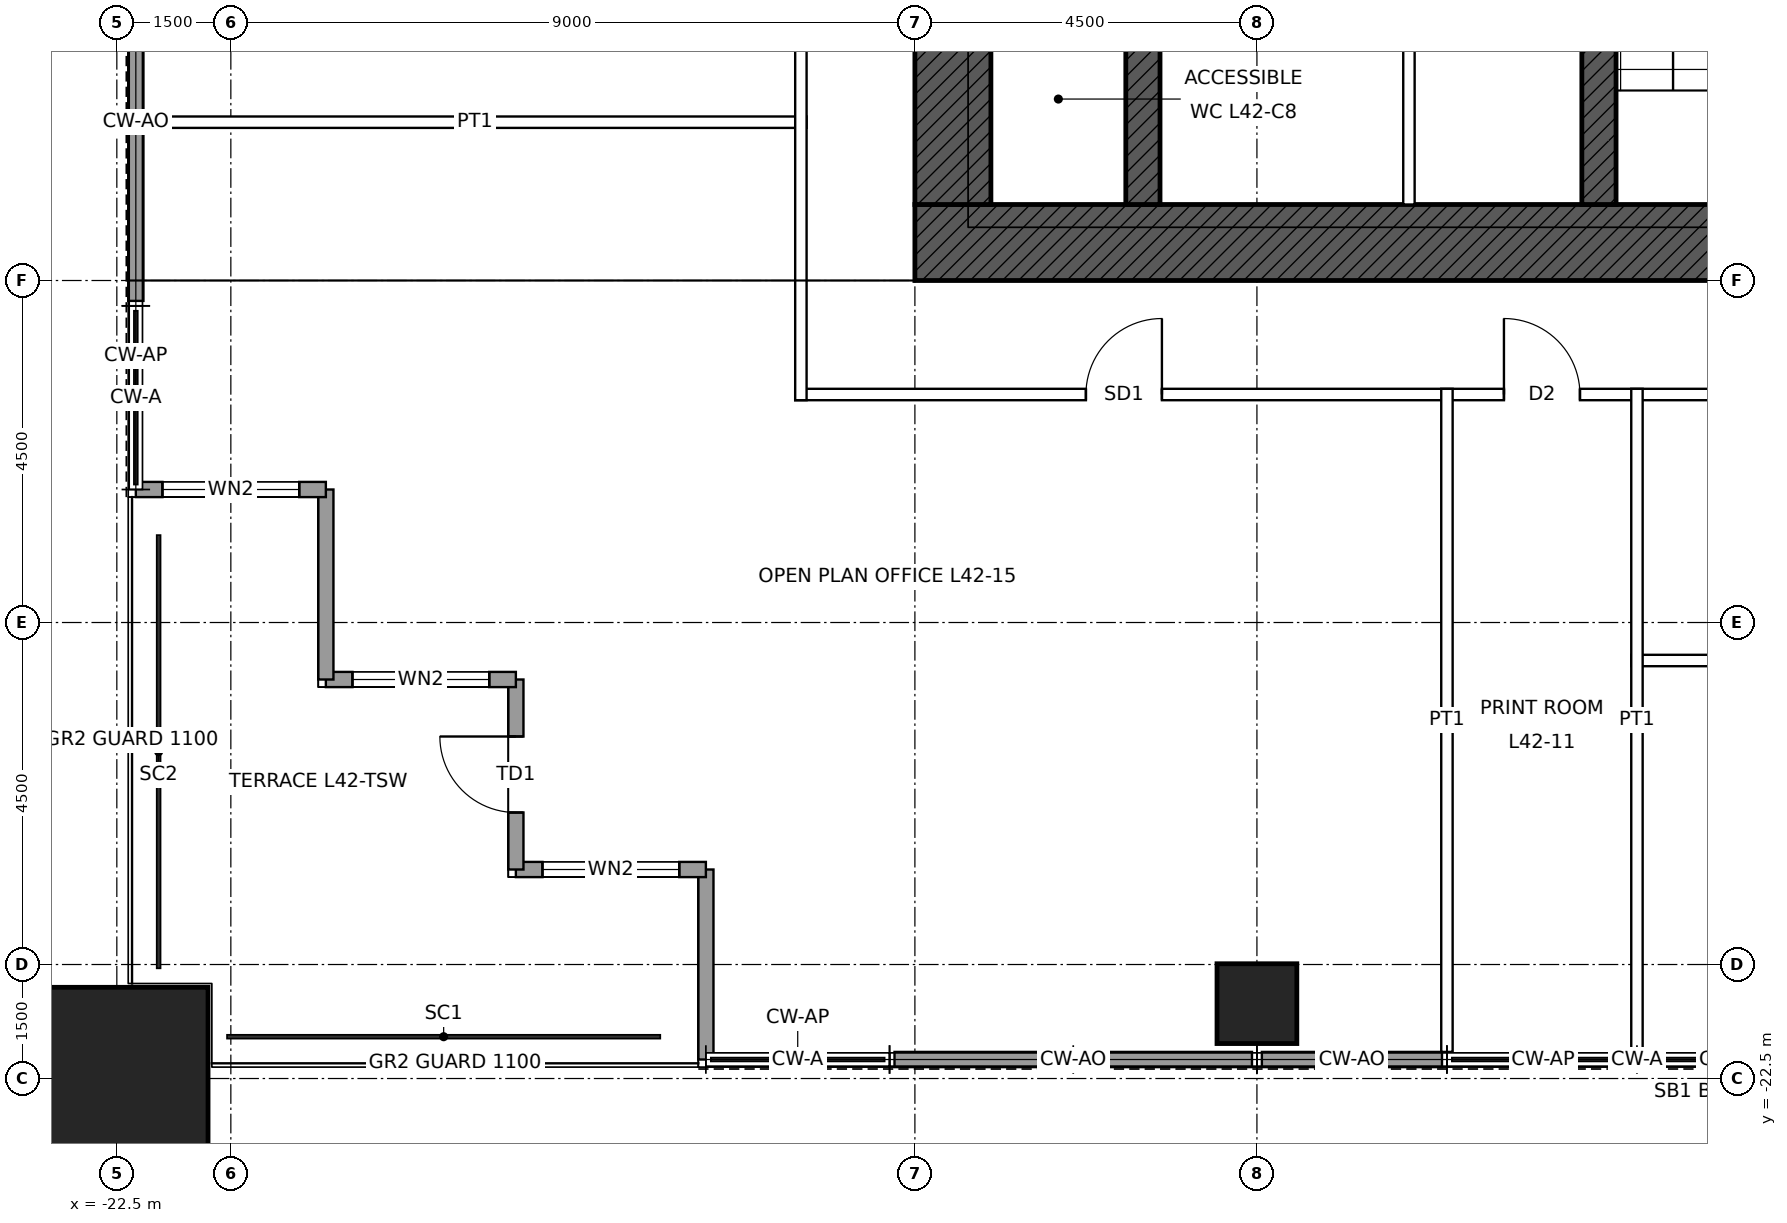
"""IFC4 building model, lengths in metres.
Left out: names, types, materials, properties, quantities, classifications, styles, units other than length and angle.
Written with IfcOpenShell. Run it as: python <this file> out.ifc"""

import sys

from ifc_helpers import new_model, si_unit, direction, frame, frame_2d, origin, origin_2d, place, context, subcontext, project, spatial, rectangle, hollow_rectangle, extrude, element, fill, save


model = new_model("IFC4")
c1 = context("Model", 3, precision=1e-05, world=origin(), true_north=direction((0.0, 1.0)))
c2 = subcontext(c1, "Body", "Model", "MODEL_VIEW")
j1 = project(units=[si_unit("LENGTHUNIT", "METRE"), si_unit("PLANEANGLEUNIT", "RADIAN")], contexts=[c1])
p1 = place(None, origin())
s1 = spatial("IfcSite", under=j1, at=p1, CompositionType="ELEMENT")
p2 = place(p1, origin())
s2 = spatial("IfcBuilding", under=s1, at=p2, CompositionType="ELEMENT")
p3 = place(p2, frame((0.0, 0.0, 201.9)))
s3 = spatial("IfcBuildingStorey", under=s2, at=p3, CompositionType="ELEMENT", Elevation=201.9)
p4 = place(p3, frame((-22.5, -22.5, 0.0), z_axis=(0.0, 0.0, 1.0), x_axis=(1.0, 0.0, 0.0)))
e1 = element("IfcColumn", 1, at=p4, inside=s3, PredefinedType="COLUMN", context=c2, shape_type="SweptSolid", body=[
    extrude(hollow_rectangle(XDim=2.4, YDim=2.4, WallThickness=0.12, at=origin_2d()), origin(), (0.0, 0.0, 1.0), 4.0),
])
p5 = place(p3, frame((-7.5, -21.515, 0.0), z_axis=(0.0, 0.0, 1.0), x_axis=(1.0, 0.0, 0.0)))
e2 = element("IfcColumn", 2, at=p5, inside=s3, PredefinedType="COLUMN", context=c2, shape_type="SweptSolid", body=[
    extrude(hollow_rectangle(XDim=1.05, YDim=1.05, WallThickness=0.07, at=origin_2d()), origin(), (0.0, 0.0, 1.0), 4.0),
])
p6 = place(p3, frame((12.0, -11.5, 0.0), z_axis=(0.0, 0.0, 1.0), x_axis=(-1.0, 0.0, 0.0)))
e3 = element("IfcWall", 3, at=p6, inside=s3, PredefinedType="SHEAR", context=c2, shape_type="SweptSolid", body=[
    extrude(rectangle(XDim=24.0, YDim=1.0, at=frame_2d((12.0, 0.0))), origin(), (0.0, 0.0, 1.0), 4.0),
])
p7 = place(p6, frame((11.5, 0.0, 0.0)))
e4 = element("IfcOpeningElement", 4, at=p7, cuts=e3, PredefinedType="OPENING", context=c2, shape_type="SweptSolid", body=[
    extrude(rectangle(XDim=1.0, YDim=2.1, at=frame_2d((0.5, 1.05))), frame((0.0, 0.51, 0.0), z_axis=(0.0, -1.0, 0.0), x_axis=(1.0, 0.0, 0.0)), (0.0, 0.0, 1.0), 1.02),
])
p8 = place(p6, frame((1.0, 0.0, 0.0)))
e5 = element("IfcOpeningElement", 5, at=p8, cuts=e3, PredefinedType="OPENING", context=c2, shape_type="SweptSolid", body=[
    extrude(rectangle(XDim=1.0, YDim=2.4, at=frame_2d((0.5, 1.2))), frame((0.0, 0.51, 0.0), z_axis=(0.0, -1.0, 0.0), x_axis=(1.0, 0.0, 0.0)), (0.0, 0.0, 1.0), 1.02),
])
p9 = place(p3, frame((-11.5, -11.0, 0.0), z_axis=(0.0, 0.0, 1.0), x_axis=(0.0, 1.0, 0.0)))
e6 = element("IfcWall", 6, at=p9, inside=s3, PredefinedType="SHEAR", context=c2, shape_type="SweptSolid", body=[
    extrude(rectangle(XDim=22.0, YDim=1.0, at=frame_2d((11.0, 0.0))), origin(), (0.0, 0.0, 1.0), 4.0),
])
p10 = place(p9, frame((10.5, 0.0, 0.0)))
e7 = element("IfcOpeningElement", 7, at=p10, cuts=e6, PredefinedType="OPENING", context=c2, shape_type="SweptSolid", body=[
    extrude(rectangle(XDim=1.0, YDim=2.4, at=frame_2d((0.5, 1.2))), frame((0.0, 0.51, 0.0), z_axis=(0.0, -1.0, 0.0), x_axis=(1.0, 0.0, 0.0)), (0.0, 0.0, 1.0), 1.02),
])
p11 = place(p3, frame((-9.0, -11.0, 0.0), z_axis=(0.0, 0.0, 1.0), x_axis=(0.0, 1.0, 0.0)))
e8 = element("IfcWall", 8, at=p11, inside=s3, PredefinedType="SHEAR", context=c2, shape_type="SweptSolid", body=[
    extrude(rectangle(XDim=6.5, YDim=0.45, at=frame_2d((3.25, 0.0))), origin(), (0.0, 0.0, 1.0), 4.0),
])
p12 = place(p11, frame((4.25, 0.0, 0.0)))
e9 = element("IfcOpeningElement", 9, at=p12, cuts=e8, PredefinedType="OPENING", context=c2, shape_type="SweptSolid", body=[
    extrude(rectangle(XDim=1.0, YDim=2.1, at=frame_2d((0.5, 1.05))), frame((0.0, 0.235, 0.0), z_axis=(0.0, -1.0, 0.0), x_axis=(1.0, 0.0, 0.0)), (0.0, 0.0, 1.0), 0.47),
])
p13 = place(p3, frame((-3.0, -11.0, 0.0), z_axis=(0.0, 0.0, 1.0), x_axis=(0.0, 1.0, 0.0)))
e10 = element("IfcWall", 10, at=p13, inside=s3, PredefinedType="SHEAR", context=c2, shape_type="SweptSolid", body=[
    extrude(rectangle(XDim=6.5, YDim=0.45, at=frame_2d((3.25, 0.0))), origin(), (0.0, 0.0, 1.0), 4.0),
])
p14 = place(p3, frame((-14.75, -22.25, 0.0), z_axis=(0.0, 0.0, 1.0), x_axis=(0.0, 1.0, 0.0)))
e11 = element("IfcWall", 11, at=p14, inside=s3, PredefinedType="SOLIDWALL", context=c2, shape_type="SweptSolid", body=[
    extrude(rectangle(XDim=2.5, YDim=0.2, at=frame_2d((1.25, 0.0))), origin(), (0.0, 0.0, 1.0), 3.85),
])
p15 = place(p3, frame((-14.75, -19.75, 0.0), z_axis=(0.0, 0.0, 1.0), x_axis=(-1.0, 0.0, 0.0)))
e12 = element("IfcWall", 12, at=p15, inside=s3, PredefinedType="SOLIDWALL", context=c2, shape_type="SweptSolid", body=[
    extrude(rectangle(XDim=2.5, YDim=0.2, at=frame_2d((1.25, 0.0))), origin(), (0.0, 0.0, 1.0), 3.85),
])
p16 = place(p15, frame((0.35, 0.0, 0.3)))
e13 = element("IfcOpeningElement", 13, at=p16, cuts=e12, PredefinedType="OPENING", context=c2, shape_type="SweptSolid", body=[
    extrude(rectangle(XDim=1.8, YDim=2.4, at=frame_2d((0.9, 1.2))), frame((0.0, 0.11, 0.0), z_axis=(0.0, -1.0, 0.0), x_axis=(1.0, 0.0, 0.0)), (0.0, 0.0, 1.0), 0.22),
])
p17 = place(p3, frame((-17.25, -19.75, 0.0), z_axis=(0.0, 0.0, 1.0), x_axis=(0.0, 1.0, 0.0)))
e14 = element("IfcWall", 14, at=p17, inside=s3, PredefinedType="SOLIDWALL", context=c2, shape_type="SweptSolid", body=[
    extrude(rectangle(XDim=2.5, YDim=0.2, at=frame_2d((1.25, 0.0))), origin(), (0.0, 0.0, 1.0), 3.85),
])
p18 = place(p17, frame((0.75, 0.0, 0.0)))
e15 = element("IfcOpeningElement", 15, at=p18, cuts=e14, PredefinedType="OPENING", context=c2, shape_type="SweptSolid", body=[
    extrude(rectangle(XDim=1.0, YDim=2.4, at=frame_2d((0.5, 1.2))), frame((0.0, 0.11, 0.0), z_axis=(0.0, -1.0, 0.0), x_axis=(1.0, 0.0, 0.0)), (0.0, 0.0, 1.0), 0.22),
])
p19 = place(p3, frame((-17.25, -17.25, 0.0), z_axis=(0.0, 0.0, 1.0), x_axis=(-1.0, 0.0, 0.0)))
e16 = element("IfcWall", 16, at=p19, inside=s3, PredefinedType="SOLIDWALL", context=c2, shape_type="SweptSolid", body=[
    extrude(rectangle(XDim=2.5, YDim=0.2, at=frame_2d((1.25, 0.0))), origin(), (0.0, 0.0, 1.0), 3.85),
])
p20 = place(p19, frame((0.35, 0.0, 0.3)))
e17 = element("IfcOpeningElement", 17, at=p20, cuts=e16, PredefinedType="OPENING", context=c2, shape_type="SweptSolid", body=[
    extrude(rectangle(XDim=1.8, YDim=2.4, at=frame_2d((0.9, 1.2))), frame((0.0, 0.11, 0.0), z_axis=(0.0, -1.0, 0.0), x_axis=(1.0, 0.0, 0.0)), (0.0, 0.0, 1.0), 0.22),
])
p21 = place(p3, frame((-19.75, -17.25, 0.0), z_axis=(0.0, 0.0, 1.0), x_axis=(0.0, 1.0, 0.0)))
e18 = element("IfcWall", 18, at=p21, inside=s3, PredefinedType="SOLIDWALL", context=c2, shape_type="SweptSolid", body=[
    extrude(rectangle(XDim=2.5, YDim=0.2, at=frame_2d((1.25, 0.0))), origin(), (0.0, 0.0, 1.0), 3.85),
])
p22 = place(p3, frame((-19.75, -14.75, 0.0), z_axis=(0.0, 0.0, 1.0), x_axis=(-1.0, 0.0, 0.0)))
e19 = element("IfcWall", 19, at=p22, inside=s3, PredefinedType="SOLIDWALL", context=c2, shape_type="SweptSolid", body=[
    extrude(rectangle(XDim=2.5, YDim=0.2, at=frame_2d((1.25, 0.0))), origin(), (0.0, 0.0, 1.0), 3.85),
])
p23 = place(p22, frame((0.35, 0.0, 0.3)))
e20 = element("IfcOpeningElement", 20, at=p23, cuts=e19, PredefinedType="OPENING", context=c2, shape_type="SweptSolid", body=[
    extrude(rectangle(XDim=1.8, YDim=2.4, at=frame_2d((0.9, 1.2))), frame((0.0, 0.11, 0.0), z_axis=(0.0, -1.0, 0.0), x_axis=(1.0, 0.0, 0.0)), (0.0, 0.0, 1.0), 0.22),
])
p24 = place(p3, frame((-5.065, -22.25, 0.0), z_axis=(0.0, 0.0, 1.0), x_axis=(-1.0, 0.0, 0.0)))
e21 = element("IfcWall", 21, at=p24, inside=s3, PredefinedType="SOLIDWALL", context=c2, shape_type="SweptSolid", body=[
    extrude(rectangle(XDim=2.37, YDim=0.2, at=frame_2d((1.185, 0.0))), origin(), (0.0, 0.0, 1.0), 3.85),
])
for number, where, z_axis, x_axis in (
    (22, (-7.565, -22.25, 0.0), (0.0, 0.0, 1.0), (-1.0, 0.0, 0.0)),
    (23, (-9.949, -22.25, 0.0), (0.0, 0.0, 1.0), (-1.0, 0.0, 0.0)),
    (24, (-22.25, -12.268, 0.0), (0.0, 0.0, 1.0), (0.0, 1.0, 0.0)),
    (25, (-22.25, -9.884, 0.0), (0.0, 0.0, 1.0), (0.0, 1.0, 0.0)),
):
    element("IfcWall", number, at=place(p3, frame(where, z_axis=z_axis, x_axis=x_axis)), inside=s3, PredefinedType="SOLIDWALL", context=c2, shape_type="SweptSolid", body=[
        extrude(rectangle(XDim=2.319, YDim=0.2, at=frame_2d((1.16, 0.0))), origin(), (0.0, 0.0, 1.0), 3.85),
    ])
p25 = place(p3, frame((-2.575, -17.0, 0.0), z_axis=(0.0, 0.0, 1.0), x_axis=(1.0, 0.0, 0.0)))
e26 = element("IfcWall", 26, at=p25, inside=s3, PredefinedType="PARTITIONING", context=c2, shape_type="SweptSolid", body=[
    extrude(rectangle(XDim=5.15, YDim=0.15, at=frame_2d((2.575, 0.0))), origin(), (0.0, 0.0, 1.0), 3.85),
])
p26 = place(p25, frame((2.075, 0.0, 0.0)))
e27 = element("IfcOpeningElement", 27, at=p26, cuts=e26, PredefinedType="OPENING", context=c2, shape_type="SweptSolid", body=[
    extrude(rectangle(XDim=1.0, YDim=2.1, at=frame_2d((0.5, 1.05))), frame((0.0, 0.085, 0.0), z_axis=(0.0, -1.0, 0.0), x_axis=(1.0, 0.0, 0.0)), (0.0, 0.0, 1.0), 0.17),
])
p27 = place(p3, frame((-13.575, -13.5, 0.0), z_axis=(0.0, 0.0, 1.0), x_axis=(1.0, 0.0, 0.0)))
e28 = element("IfcWall", 28, at=p27, inside=s3, PredefinedType="PARTITIONING", context=c2, shape_type="SweptSolid", body=[
    extrude(rectangle(XDim=27.15, YDim=0.15, at=frame_2d((13.575, 0.0))), origin(), (0.0, 0.0, 1.0), 3.85),
])
p28 = place(p27, frame((19.283, 0.0, 0.0)))
e29 = element("IfcOpeningElement", 29, at=p28, cuts=e28, PredefinedType="OPENING", context=c2, shape_type="SweptSolid", body=[
    extrude(rectangle(XDim=1.0, YDim=2.4, at=frame_2d((0.5, 1.2))), frame((0.0, 0.085, 0.0), z_axis=(0.0, -1.0, 0.0), x_axis=(1.0, 0.0, 0.0)), (0.0, 0.0, 1.0), 0.17),
])
p29 = place(p27, frame((9.325, 0.0, 0.0)))
e30 = element("IfcOpeningElement", 30, at=p29, cuts=e28, PredefinedType="OPENING", context=c2, shape_type="SweptSolid", body=[
    extrude(rectangle(XDim=1.0, YDim=2.1, at=frame_2d((0.5, 1.05))), frame((0.0, 0.085, 0.0), z_axis=(0.0, -1.0, 0.0), x_axis=(1.0, 0.0, 0.0)), (0.0, 0.0, 1.0), 0.17),
])
p30 = place(p27, frame((3.825, 0.0, 0.0)))
e31 = element("IfcOpeningElement", 31, at=p30, cuts=e28, PredefinedType="OPENING", context=c2, shape_type="SweptSolid", body=[
    extrude(rectangle(XDim=1.0, YDim=2.4, at=frame_2d((0.5, 1.2))), frame((0.0, 0.085, 0.0), z_axis=(0.0, -1.0, 0.0), x_axis=(1.0, 0.0, 0.0)), (0.0, 0.0, 1.0), 0.17),
])
p31 = place(p27, frame((25.318, 0.0, 0.0)))
e32 = element("IfcOpeningElement", 32, at=p31, cuts=e28, PredefinedType="OPENING", context=c2, shape_type="SweptSolid", body=[
    extrude(rectangle(XDim=1.0, YDim=2.4, at=frame_2d((0.5, 1.2))), frame((0.0, 0.085, 0.0), z_axis=(0.0, -1.0, 0.0), x_axis=(1.0, 0.0, 0.0)), (0.0, 0.0, 1.0), 0.17),
])
p32 = place(p3, frame((-22.15, -9.917, 0.0), z_axis=(0.0, 0.0, 1.0), x_axis=(1.0, 0.0, 0.0)))
e33 = element("IfcWall", 33, at=p32, inside=s3, PredefinedType="PARTITIONING", context=c2, shape_type="SweptSolid", body=[
    extrude(rectangle(XDim=8.725, YDim=0.15, at=frame_2d((4.362, 0.0))), origin(), (0.0, 0.0, 1.0), 3.85),
])
p33 = place(p3, frame((-13.5, -13.575, 0.0), z_axis=(0.0, 0.0, 1.0), x_axis=(0.0, 1.0, 0.0)))
e34 = element("IfcWall", 34, at=p33, inside=s3, PredefinedType="PARTITIONING", context=c2, shape_type="SweptSolid", body=[
    extrude(rectangle(XDim=13.65, YDim=0.15, at=frame_2d((6.825, 0.0))), origin(), (0.0, 0.0, 1.0), 3.85),
])
for number, where, z_axis, x_axis in (
    (35, (-5.0, -22.15, 0.0), (0.0, 0.0, 1.0), (0.0, 1.0, 0.0)),
    (36, (-2.5, -22.15, 0.0), (0.0, 0.0, 1.0), (0.0, 1.0, 0.0)),
):
    element("IfcWall", number, at=place(p3, frame(where, z_axis=z_axis, x_axis=x_axis)), inside=s3, PredefinedType="PARTITIONING", context=c2, shape_type="SweptSolid", body=[
        extrude(rectangle(XDim=8.725, YDim=0.15, at=frame_2d((4.362, 0.0))), origin(), (0.0, 0.0, 1.0), 3.85),
    ])
p34 = place(p3, frame((-5.5, -11.0, 0.0), z_axis=(0.0, 0.0, 1.0), x_axis=(0.0, 1.0, 0.0)))
e37 = element("IfcWall", 37, at=p34, inside=s3, PredefinedType="PARTITIONING", context=c2, shape_type="SweptSolid", body=[
    extrude(rectangle(XDim=6.275, YDim=0.15, at=frame_2d((3.137, 0.0))), origin(), (0.0, 0.0, 1.0), 3.75),
])
p35 = place(p34, frame((2.637, 0.0, 0.0)))
e38 = element("IfcOpeningElement", 38, at=p35, cuts=e37, PredefinedType="OPENING", context=c2, shape_type="SweptSolid", body=[
    extrude(rectangle(XDim=1.0, YDim=2.1, at=frame_2d((0.5, 1.05))), frame((0.0, 0.085, 0.0), z_axis=(0.0, -1.0, 0.0), x_axis=(1.0, 0.0, 0.0)), (0.0, 0.0, 1.0), 0.17),
])
p36 = place(p16, origin())
e39 = element("IfcWindow", 39, at=p36, inside=s3, PartitioningType="SINGLE_PANEL", PredefinedType="WINDOW", context=c2, shape_type="SweptSolid", body=[
    extrude(rectangle(XDim=1.8, YDim=2.4, at=frame_2d((0.9, 1.2))), frame((0.0, 0.03, 0.0), z_axis=(0.0, -1.0, 0.0), x_axis=(1.0, 0.0, 0.0)), (0.0, 0.0, 1.0), 0.06),
])
fill(e13, e39)
p37 = place(p18, origin())
e40 = element("IfcDoor", 40, at=p37, inside=s3, OperationType="SINGLE_SWING_RIGHT", PredefinedType="DOOR", context=c2, shape_type="SweptSolid", body=[
    extrude(rectangle(XDim=1.0, YDim=2.4, at=frame_2d((0.5, 1.2))), frame((0.0, 0.025, 0.0), z_axis=(0.0, -1.0, 0.0), x_axis=(1.0, 0.0, 0.0)), (0.0, 0.0, 1.0), 0.05),
])
fill(e15, e40)
p38 = place(p20, origin())
e41 = element("IfcWindow", 41, at=p38, inside=s3, PartitioningType="SINGLE_PANEL", PredefinedType="WINDOW", context=c2, shape_type="SweptSolid", body=[
    extrude(rectangle(XDim=1.8, YDim=2.4, at=frame_2d((0.9, 1.2))), frame((0.0, 0.03, 0.0), z_axis=(0.0, -1.0, 0.0), x_axis=(1.0, 0.0, 0.0)), (0.0, 0.0, 1.0), 0.06),
])
fill(e17, e41)
p39 = place(p23, origin())
e42 = element("IfcWindow", 42, at=p39, inside=s3, PartitioningType="SINGLE_PANEL", PredefinedType="WINDOW", context=c2, shape_type="SweptSolid", body=[
    extrude(rectangle(XDim=1.8, YDim=2.4, at=frame_2d((0.9, 1.2))), frame((0.0, 0.03, 0.0), z_axis=(0.0, -1.0, 0.0), x_axis=(1.0, 0.0, 0.0)), (0.0, 0.0, 1.0), 0.06),
])
fill(e20, e42)
p40 = place(p29, origin())
e43 = element("IfcDoor", 43, at=p40, inside=s3, OperationType="SINGLE_SWING_LEFT", PredefinedType="DOOR", context=c2, shape_type="SweptSolid", body=[
    extrude(rectangle(XDim=1.0, YDim=2.1, at=frame_2d((0.5, 1.05))), frame((0.0, 0.025, 0.0), z_axis=(0.0, -1.0, 0.0), x_axis=(1.0, 0.0, 0.0)), (0.0, 0.0, 1.0), 0.05),
])
fill(e30, e43)
p41 = place(p30, origin())
e44 = element("IfcDoor", 44, at=p41, inside=s3, OperationType="SINGLE_SWING_RIGHT", PredefinedType="DOOR", context=c2, shape_type="SweptSolid", body=[
    extrude(rectangle(XDim=1.0, YDim=2.4, at=frame_2d((0.5, 1.2))), frame((0.0, 0.025, 0.0), z_axis=(0.0, -1.0, 0.0), x_axis=(1.0, 0.0, 0.0)), (0.0, 0.0, 1.0), 0.05),
])
fill(e31, e44)
save(model, sys.argv[1])
